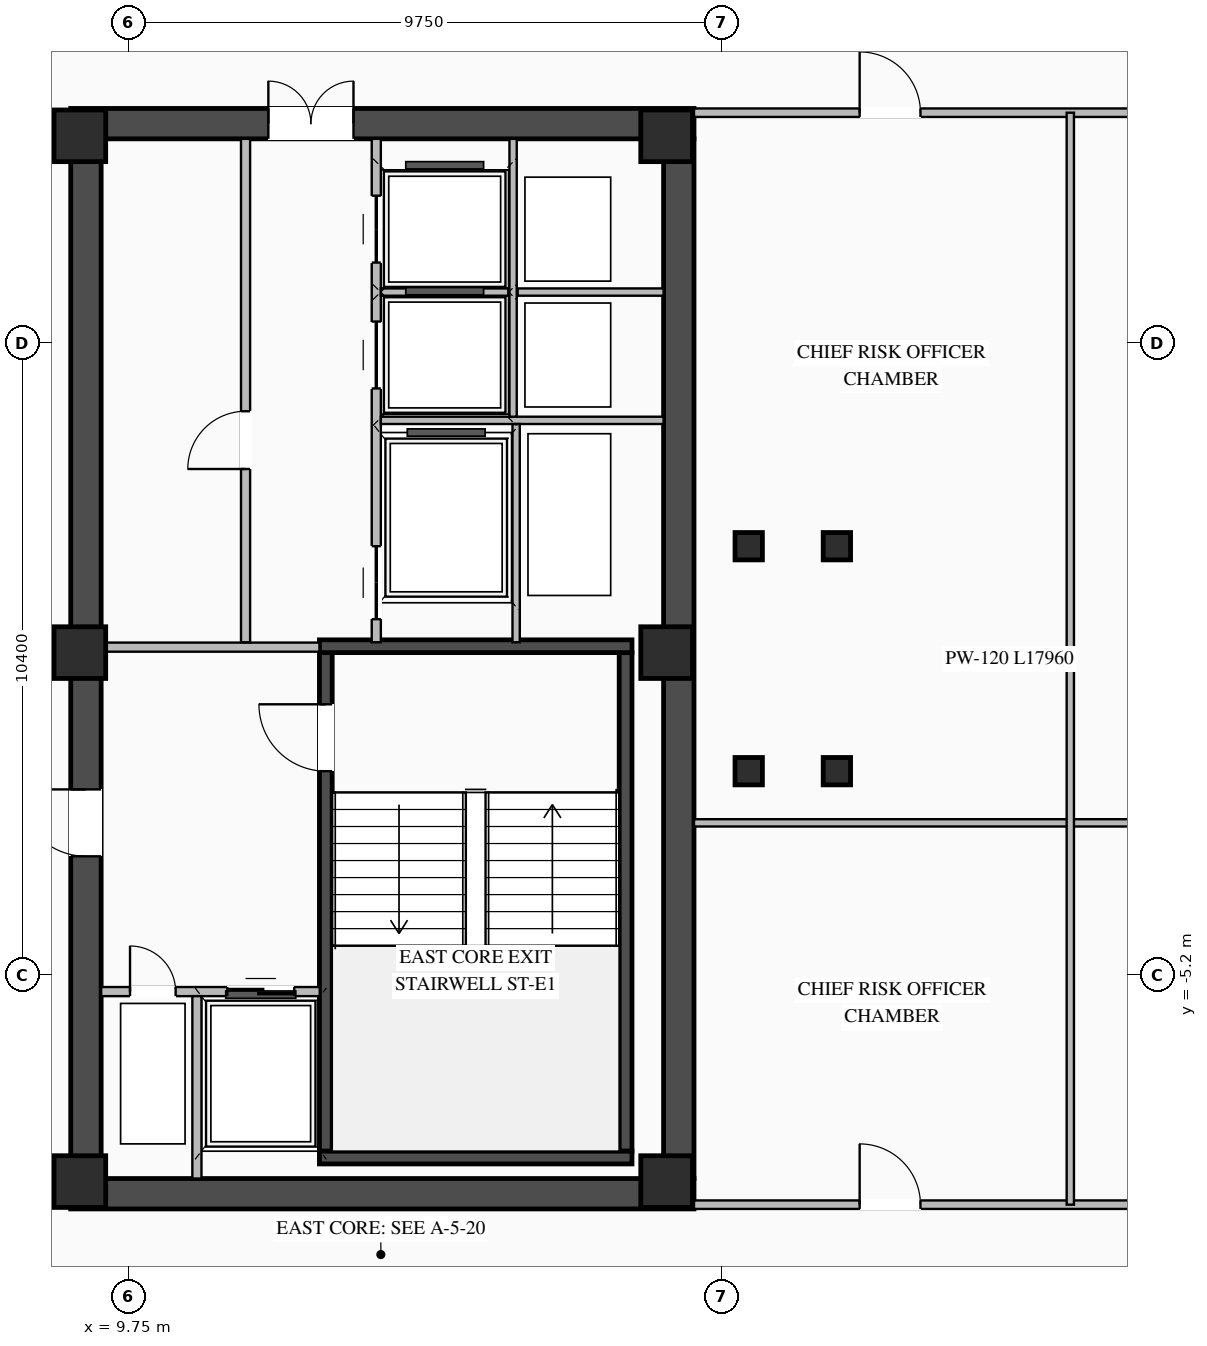
"""IFC4 building model, lengths in metres.
Left out: names, types, materials, properties, quantities, classifications, styles, units other than length and angle.
Written with IfcOpenShell. Run it as: python <this file> out.ifc"""

import sys

from ifc_helpers import new_model, si_unit, direction, frame, frame_2d, origin, origin_2d, place, context, subcontext, project, spatial, rectangle, i_section, extrude, element, fill, save


model = new_model("IFC4")
c1 = context("Model", 3, precision=1e-05, world=origin(), true_north=direction((0.0, 1.0)))
c2 = subcontext(c1, "Body", "Model", "MODEL_VIEW")
j1 = project(units=[si_unit("LENGTHUNIT", "METRE"), si_unit("PLANEANGLEUNIT", "RADIAN")], contexts=[c1])
p1 = place(None, origin())
s1 = spatial("IfcSite", under=j1, at=p1, CompositionType="ELEMENT")
p2 = place(p1, origin())
s2 = spatial("IfcBuilding", under=s1, at=p2, CompositionType="ELEMENT")
p3 = place(p2, frame((0.0, 0.0, 251.7)))
s3 = spatial("IfcBuildingStorey", under=s2, at=p3, CompositionType="ELEMENT", Elevation=251.7)
p4 = place(p3, frame((8.8, -8.8, 0.0), z_axis=(0.0, 0.0, 1.0), x_axis=(1.0, 0.0, 0.0)))
e1 = element("IfcWall", 1, at=p4, inside=s3, PredefinedType="SHEAR", context=c2, shape_type="SweptSolid", body=[
    extrude(rectangle(XDim=10.25, YDim=0.5, at=frame_2d((5.125, 0.0))), origin(), (0.0, 0.0, 1.0), 3.27),
])
p5 = place(p3, frame((8.8, 8.8, 0.0), z_axis=(0.0, 0.0, 1.0), x_axis=(1.0, 0.0, 0.0)))
e2 = element("IfcWall", 2, at=p5, inside=s3, PredefinedType="SHEAR", context=c2, shape_type="SweptSolid", body=[
    extrude(rectangle(XDim=10.25, YDim=0.5, at=frame_2d((5.125, 0.0))), origin(), (0.0, 0.0, 1.0), 3.27),
])
p6 = place(p5, frame((3.25, 0.0, 0.0)))
e3 = element("IfcOpeningElement", 3, at=p6, cuts=e2, PredefinedType="OPENING", context=c2, shape_type="SweptSolid", body=[
    extrude(rectangle(XDim=1.4, YDim=2.05, at=frame_2d((0.7, 1.025))), frame((0.0, 0.26, 0.0), z_axis=(0.0, -1.0, 0.0), x_axis=(1.0, 0.0, 0.0)), (0.0, 0.0, 1.0), 0.52),
])
p7 = place(p3, frame((9.05, -8.55, 0.0), z_axis=(0.0, 0.0, 1.0), x_axis=(0.0, 1.0, 0.0)))
e4 = element("IfcWall", 4, at=p7, inside=s3, PredefinedType="SHEAR", context=c2, shape_type="SweptSolid", body=[
    extrude(rectangle(XDim=17.1, YDim=0.5, at=frame_2d((8.55, 0.0))), origin(), (0.0, 0.0, 1.0), 3.27),
])
p8 = place(p7, frame((5.3, 0.0, 0.0)))
e5 = element("IfcOpeningElement", 5, at=p8, cuts=e4, PredefinedType="OPENING", context=c2, shape_type="SweptSolid", body=[
    extrude(rectangle(XDim=1.1, YDim=2.08, at=frame_2d((0.55, 1.04))), frame((0.0, 0.26, 0.0), z_axis=(0.0, -1.0, 0.0), x_axis=(1.0, 0.0, 0.0)), (0.0, 0.0, 1.0), 0.52),
])
p9 = place(p3, frame((18.8, -8.55, 0.0), z_axis=(0.0, 0.0, 1.0), x_axis=(0.0, 1.0, 0.0)))
e6 = element("IfcWall", 6, at=p9, inside=s3, PredefinedType="SHEAR", context=c2, shape_type="SweptSolid", body=[
    extrude(rectangle(XDim=17.1, YDim=0.5, at=frame_2d((8.55, 0.0))), origin(), (0.0, 0.0, 1.0), 3.27),
])
p10 = place(p3, frame((12.995, -8.1, 0.0), z_axis=(0.0, 0.0, 1.0), x_axis=(0.0, 1.0, 0.0)))
e7 = element("IfcWall", 7, at=p10, inside=s3, PredefinedType="SHEAR", context=c2, shape_type="SweptSolid", body=[
    extrude(rectangle(XDim=8.2, YDim=0.21, at=frame_2d((4.1, 0.0))), origin(), (0.0, 0.0, 1.0), 3.27),
])
p11 = place(p10, frame((6.25, 0.0, 0.0)))
e8 = element("IfcOpeningElement", 8, at=p11, cuts=e7, PredefinedType="OPENING", context=c2, shape_type="SweptSolid", body=[
    extrude(rectangle(XDim=1.1, YDim=2.15, at=frame_2d((0.55, 1.075))), frame((0.0, 0.115, 0.0), z_axis=(0.0, -1.0, 0.0), x_axis=(1.0, 0.0, 0.0)), (0.0, 0.0, 1.0), 0.23),
])
p12 = place(p3, frame((17.925, -8.1, 0.0), z_axis=(0.0, 0.0, 1.0), x_axis=(0.0, 1.0, 0.0)))
e9 = element("IfcWall", 9, at=p12, inside=s3, PredefinedType="SHEAR", context=c2, shape_type="SweptSolid", body=[
    extrude(rectangle(XDim=8.2, YDim=0.21, at=frame_2d((4.1, 0.0))), origin(), (0.0, 0.0, 1.0), 3.27),
])
for number, where, z_axis, x_axis in (
    (10, (12.89, -8.205, 0.0), (0.0, 0.0, 1.0), (1.0, 0.0, 0.0)),
    (11, (18.03, 0.205, 0.0), (0.0, 0.0, 1.0), (-1.0, 0.0, 0.0)),
):
    element("IfcWall", number, at=place(p3, frame(where, z_axis=z_axis, x_axis=x_axis)), inside=s3, PredefinedType="SHEAR", context=c2, shape_type="SweptSolid", body=[
        extrude(rectangle(XDim=5.14, YDim=0.21, at=frame_2d((2.57, 0.0))), origin(), (0.0, 0.0, 1.0), 3.27),
    ])
for number, where, z_axis, x_axis in (
    (12, (8.95, -8.6, 0.0), (0.0, 0.0, 1.0), (1.0, 0.0, 0.0)),
    (13, (8.95, 0.1, 0.0), (0.0, 0.0, 1.0), (1.0, 0.0, 0.0)),
    (14, (8.95, 8.6, 0.0), (0.0, 0.0, 1.0), (1.0, 0.0, 0.0)),
    (15, (18.6, -8.6, 0.0), (0.0, 0.0, 1.0), (1.0, 0.0, 0.0)),
    (16, (18.6, 0.1, 0.0), (0.0, 0.0, 1.0), (1.0, 0.0, 0.0)),
    (17, (18.6, 8.6, 0.0), (0.0, 0.0, 1.0), (1.0, 0.0, 0.0)),
):
    element("IfcColumn", number, at=place(p3, frame(where, z_axis=z_axis, x_axis=x_axis)), inside=s3, PredefinedType="COLUMN", context=c2, shape_type="SweptSolid", body=[
        extrude(rectangle(XDim=0.85, YDim=0.85, at=origin_2d()), origin(), (0.0, 0.0, 1.0), 3.45),
    ])
for number, where, z_axis, x_axis in (
    (18, (19.95, -1.85, 0.0), (0.0, 0.0, 1.0), (1.0, 0.0, 0.0)),
    (19, (19.95, 1.85, 0.0), (0.0, 0.0, 1.0), (1.0, 0.0, 0.0)),
    (20, (21.4, -1.85, 0.0), (0.0, 0.0, 1.0), (1.0, 0.0, 0.0)),
    (21, (21.4, 1.85, 0.0), (0.0, 0.0, 1.0), (1.0, 0.0, 0.0)),
):
    element("IfcColumn", number, at=place(p3, frame(where, z_axis=z_axis, x_axis=x_axis)), inside=s3, PredefinedType="COLUMN", context=c2, shape_type="SweptSolid", body=[
        extrude(i_section(OverallWidth=0.45, OverallDepth=0.45, WebThickness=0.022, FlangeThickness=0.032, at=origin_2d()), origin(), (0.0, 0.0, 1.0), 3.45),
    ])
p13 = place(p3, frame((9.3, -5.475, 0.0), z_axis=(0.0, 0.0, 1.0), x_axis=(1.0, 0.0, 0.0)))
e22 = element("IfcWall", 22, at=p13, inside=s3, PredefinedType="STANDARD", context=c2, shape_type="SweptSolid", body=[
    extrude(rectangle(XDim=3.595, YDim=0.15, at=frame_2d((1.797, 0.0))), origin(), (0.0, 0.0, 1.0), 3.25),
])
p14 = place(p13, frame((2.075, 0.0, 0.0)))
e23 = element("IfcOpeningElement", 23, at=p14, cuts=e22, PredefinedType="OPENING", context=c2, shape_type="SweptSolid", body=[
    extrude(rectangle(XDim=1.1, YDim=2.15, at=frame_2d((0.55, 1.075))), frame((0.0, 0.085, 0.0), z_axis=(0.0, -1.0, 0.0), x_axis=(1.0, 0.0, 0.0)), (0.0, 0.0, 1.0), 0.17),
])
p15 = place(p13, frame((0.475, 0.0, 0.0)))
e24 = element("IfcOpeningElement", 24, at=p15, cuts=e22, PredefinedType="OPENING", context=c2, shape_type="SweptSolid", body=[
    extrude(rectangle(XDim=0.75, YDim=2.05, at=frame_2d((0.375, 1.025))), frame((0.0, 0.085, 0.0), z_axis=(0.0, -1.0, 0.0), x_axis=(1.0, 0.0, 0.0)), (0.0, 0.0, 1.0), 0.17),
])
p16 = place(p3, frame((10.875, -8.55, 0.0), z_axis=(0.0, 0.0, 1.0), x_axis=(0.0, 1.0, 0.0)))
e25 = element("IfcWall", 25, at=p16, inside=s3, PredefinedType="STANDARD", context=c2, shape_type="SweptSolid", body=[
    extrude(rectangle(XDim=3.0, YDim=0.15, at=frame_2d((1.5, 0.0))), origin(), (0.0, 0.0, 1.0), 3.25),
])
p17 = place(p3, frame((9.3, 0.19, 0.0), z_axis=(0.0, 0.0, 1.0), x_axis=(1.0, 0.0, 0.0)))
e26 = element("IfcWall", 26, at=p17, inside=s3, PredefinedType="STANDARD", context=c2, shape_type="SweptSolid", body=[
    extrude(rectangle(XDim=3.59, YDim=0.15, at=frame_2d((1.795, 0.0))), origin(), (0.0, 0.0, 1.0), 2.645),
])
p18 = place(p3, frame((11.675, 0.27, 0.0), z_axis=(0.0, 0.0, 1.0), x_axis=(0.0, 1.0, 0.0)))
e27 = element("IfcWall", 27, at=p18, inside=s3, PredefinedType="STANDARD", context=c2, shape_type="SweptSolid", body=[
    extrude(rectangle(XDim=8.28, YDim=0.15, at=frame_2d((4.14, 0.0))), origin(), (0.0, 0.0, 1.0), 3.25),
])
p19 = place(p18, frame((2.85, 0.0, 0.0)))
e28 = element("IfcOpeningElement", 28, at=p19, cuts=e27, PredefinedType="OPENING", context=c2, shape_type="SweptSolid", body=[
    extrude(rectangle(XDim=0.95, YDim=2.05, at=frame_2d((0.475, 1.025))), frame((0.0, 0.085, 0.0), z_axis=(0.0, -1.0, 0.0), x_axis=(1.0, 0.0, 0.0)), (0.0, 0.0, 1.0), 0.17),
])
p20 = place(p3, frame((13.825, 0.27, 0.0), z_axis=(0.0, 0.0, 1.0), x_axis=(0.0, 1.0, 0.0)))
e29 = element("IfcWall", 29, at=p20, inside=s3, PredefinedType="STANDARD", context=c2, shape_type="SweptSolid", body=[
    extrude(rectangle(XDim=8.28, YDim=0.15, at=frame_2d((4.14, 0.0))), origin(), (0.0, 0.0, 1.0), 3.25),
])
p21 = place(p20, frame((4.175, 0.0, 0.0)))
e30 = element("IfcOpeningElement", 30, at=p21, cuts=e29, PredefinedType="OPENING", context=c2, shape_type="SweptSolid", body=[
    extrude(rectangle(XDim=1.1, YDim=2.1, at=frame_2d((0.55, 1.05))), frame((0.0, 0.085, 0.0), z_axis=(0.0, -1.0, 0.0), x_axis=(1.0, 0.0, 0.0)), (0.0, 0.0, 1.0), 0.17),
])
p22 = place(p20, frame((6.245, 0.0, 0.0)))
e31 = element("IfcOpeningElement", 31, at=p22, cuts=e29, PredefinedType="OPENING", context=c2, shape_type="SweptSolid", body=[
    extrude(rectangle(XDim=1.1, YDim=2.1, at=frame_2d((0.55, 1.05))), frame((0.0, 0.085, 0.0), z_axis=(0.0, -1.0, 0.0), x_axis=(1.0, 0.0, 0.0)), (0.0, 0.0, 1.0), 0.17),
])
p23 = place(p20, frame((0.38, 0.0, 0.0)))
e32 = element("IfcOpeningElement", 32, at=p23, cuts=e29, PredefinedType="OPENING", context=c2, shape_type="SweptSolid", body=[
    extrude(rectangle(XDim=1.2, YDim=2.1, at=frame_2d((0.6, 1.05))), frame((0.0, 0.085, 0.0), z_axis=(0.0, -1.0, 0.0), x_axis=(1.0, 0.0, 0.0)), (0.0, 0.0, 1.0), 0.17),
])
p24 = place(p3, frame((13.9, 3.92, 0.0), z_axis=(0.0, 0.0, 1.0), x_axis=(1.0, 0.0, 0.0)))
e33 = element("IfcWall", 33, at=p24, inside=s3, PredefinedType="STANDARD", context=c2, shape_type="SweptSolid", body=[
    extrude(rectangle(XDim=4.65, YDim=0.12, at=frame_2d((2.325, 0.0))), origin(), (0.0, 0.0, 1.0), 3.25),
])
p25 = place(p3, frame((16.15, 6.03, 0.0), z_axis=(0.0, 0.0, 1.0), x_axis=(1.0, 0.0, 0.0)))
e34 = element("IfcWall", 34, at=p25, inside=s3, PredefinedType="STANDARD", context=c2, shape_type="SweptSolid", body=[
    extrude(rectangle(XDim=2.4, YDim=0.12, at=frame_2d((1.2, 0.0))), origin(), (0.0, 0.0, 1.0), 3.25),
])
p26 = place(p3, frame((16.075, 3.98, 0.0), z_axis=(0.0, 0.0, 1.0), x_axis=(0.0, 1.0, 0.0)))
e35 = element("IfcWall", 35, at=p26, inside=s3, PredefinedType="STANDARD", context=c2, shape_type="SweptSolid", body=[
    extrude(rectangle(XDim=4.57, YDim=0.12, at=frame_2d((2.285, 0.0))), origin(), (0.0, 0.0, 1.0), 3.25),
])
p27 = place(p3, frame((13.9, 6.03, 0.0), z_axis=(0.0, 0.0, 1.0), x_axis=(1.0, 0.0, 0.0)))
e36 = element("IfcWall", 36, at=p27, inside=s3, PredefinedType="STANDARD", context=c2, shape_type="SweptSolid", body=[
    extrude(rectangle(XDim=2.1, YDim=0.12, at=frame_2d((1.05, 0.0))), origin(), (0.0, 0.0, 1.0), 3.25),
])
p28 = place(p3, frame((16.125, 0.27, 0.0), z_axis=(0.0, 0.0, 1.0), x_axis=(0.0, 1.0, 0.0)))
e37 = element("IfcWall", 37, at=p28, inside=s3, PredefinedType="STANDARD", context=c2, shape_type="SweptSolid", body=[
    extrude(rectangle(XDim=3.59, YDim=0.12, at=frame_2d((1.795, 0.0))), origin(), (0.0, 0.0, 1.0), 3.25),
])
p29 = place(p3, frame((19.05, 8.98, 0.0), z_axis=(0.0, 0.0, 1.0), x_axis=(1.0, 0.0, 0.0)))
e38 = element("IfcWall", 38, at=p29, inside=s3, PredefinedType="STANDARD", context=c2, shape_type="SweptSolid", body=[
    extrude(rectangle(XDim=10.709, YDim=0.14, at=frame_2d((5.354, 0.0))), origin(), (0.0, 0.0, 1.0), 3.25),
])
p30 = place(p29, frame((2.725, 0.0, 0.0)))
e39 = element("IfcOpeningElement", 39, at=p30, cuts=e38, PredefinedType="OPENING", context=c2, shape_type="SweptSolid", body=[
    extrude(rectangle(XDim=1.0, YDim=2.08, at=frame_2d((0.5, 1.04))), frame((0.0, 0.08, 0.0), z_axis=(0.0, -1.0, 0.0), x_axis=(1.0, 0.0, 0.0)), (0.0, 0.0, 1.0), 0.16),
])
p31 = place(p29, frame((7.819, 0.0, 0.0)))
e40 = element("IfcOpeningElement", 40, at=p31, cuts=e38, PredefinedType="OPENING", context=c2, shape_type="SweptSolid", body=[
    extrude(rectangle(XDim=1.0, YDim=2.08, at=frame_2d((0.5, 1.04))), frame((0.0, 0.08, 0.0), z_axis=(0.0, -1.0, 0.0), x_axis=(1.0, 0.0, 0.0)), (0.0, 0.0, 1.0), 0.16),
])
p32 = place(p3, frame((19.05, -8.98, 0.0), z_axis=(0.0, 0.0, 1.0), x_axis=(1.0, 0.0, 0.0)))
e41 = element("IfcWall", 41, at=p32, inside=s3, PredefinedType="STANDARD", context=c2, shape_type="SweptSolid", body=[
    extrude(rectangle(XDim=12.438, YDim=0.14, at=frame_2d((6.219, 0.0))), origin(), (0.0, 0.0, 1.0), 3.25),
])
p33 = place(p32, frame((2.725, 0.0, 0.0)))
e42 = element("IfcOpeningElement", 42, at=p33, cuts=e41, PredefinedType="OPENING", context=c2, shape_type="SweptSolid", body=[
    extrude(rectangle(XDim=1.0, YDim=2.08, at=frame_2d((0.5, 1.04))), frame((0.0, 0.08, 0.0), z_axis=(0.0, -1.0, 0.0), x_axis=(1.0, 0.0, 0.0)), (0.0, 0.0, 1.0), 0.16),
])
p34 = place(p32, frame((8.684, 0.0, 0.0)))
e43 = element("IfcOpeningElement", 43, at=p34, cuts=e41, PredefinedType="OPENING", context=c2, shape_type="SweptSolid", body=[
    extrude(rectangle(XDim=1.0, YDim=2.08, at=frame_2d((0.5, 1.04))), frame((0.0, 0.08, 0.0), z_axis=(0.0, -1.0, 0.0), x_axis=(1.0, 0.0, 0.0)), (0.0, 0.0, 1.0), 0.16),
])
p35 = place(p3, frame((19.05, -2.7, 0.0), z_axis=(0.0, 0.0, 1.0), x_axis=(1.0, 0.0, 0.0)))
e44 = element("IfcWall", 44, at=p35, inside=s3, PredefinedType="STANDARD", context=c2, shape_type="SweptSolid", body=[
    extrude(rectangle(XDim=11.833, YDim=0.12, at=frame_2d((5.917, 0.0))), origin(), (0.0, 0.0, 1.0), 3.25),
])
p36 = place(p3, frame((25.239, -8.98, 0.0), z_axis=(0.0, 0.0, 1.0), x_axis=(0.0, 1.0, 0.0)))
e45 = element("IfcWall", 45, at=p36, inside=s3, PredefinedType="STANDARD", context=c2, shape_type="SweptSolid", body=[
    extrude(rectangle(XDim=17.96, YDim=0.12, at=frame_2d((8.98, 0.0))), origin(), (0.0, 0.0, 1.0), 3.25),
])
p37 = place(p11, origin())
e46 = element("IfcDoor", 46, at=p37, inside=s3, OperationType="SINGLE_SWING_RIGHT", PredefinedType="DOOR", context=c2, shape_type="SweptSolid", body=[
    extrude(rectangle(XDim=1.1, YDim=2.15, at=frame_2d((0.55, 1.075))), frame((0.0, 0.025, 0.0), z_axis=(0.0, -1.0, 0.0), x_axis=(1.0, 0.0, 0.0)), (0.0, 0.0, 1.0), 0.05),
])
fill(e8, e46)
p38 = place(p14, origin())
e47 = element("IfcDoor", 47, at=p38, inside=s3, OperationType="DOUBLE_DOOR_SLIDING", PredefinedType="DOOR", context=c2, shape_type="SweptSolid", body=[
    extrude(rectangle(XDim=1.1, YDim=2.15, at=frame_2d((0.55, 1.075))), frame((0.0, 0.025, 0.0), z_axis=(0.0, -1.0, 0.0), x_axis=(1.0, 0.0, 0.0)), (0.0, 0.0, 1.0), 0.05),
])
fill(e23, e47)
p39 = place(p15, origin())
e48 = element("IfcDoor", 48, at=p39, inside=s3, OperationType="SINGLE_SWING_LEFT", PredefinedType="DOOR", context=c2, shape_type="SweptSolid", body=[
    extrude(rectangle(XDim=0.75, YDim=2.05, at=frame_2d((0.375, 1.025))), frame((0.0, 0.025, 0.0), z_axis=(0.0, -1.0, 0.0), x_axis=(1.0, 0.0, 0.0)), (0.0, 0.0, 1.0), 0.05),
])
fill(e24, e48)
p40 = place(p8, origin())
e49 = element("IfcDoor", 49, at=p40, inside=s3, OperationType="SINGLE_SWING_RIGHT", PredefinedType="DOOR", context=c2, shape_type="SweptSolid", body=[
    extrude(rectangle(XDim=1.1, YDim=2.08, at=frame_2d((0.55, 1.04))), frame((0.0, -0.155, 0.0), z_axis=(0.0, -1.0, 0.0), x_axis=(1.0, 0.0, 0.0)), (0.0, 0.0, 1.0), 0.05),
])
fill(e5, e49)
p41 = place(p6, origin())
e50 = element("IfcDoor", 50, at=p41, inside=s3, OperationType="DOUBLE_DOOR_SINGLE_SWING", PredefinedType="DOOR", context=c2, shape_type="SweptSolid", body=[
    extrude(rectangle(XDim=1.4, YDim=2.05, at=frame_2d((0.7, 1.025))), frame((0.0, 0.195, 0.0), z_axis=(0.0, -1.0, 0.0), x_axis=(1.0, 0.0, 0.0)), (0.0, 0.0, 1.0), 0.05),
])
fill(e3, e50)
p42 = place(p19, origin())
e51 = element("IfcDoor", 51, at=p42, inside=s3, OperationType="SINGLE_SWING_LEFT", PredefinedType="DOOR", context=c2, shape_type="SweptSolid", body=[
    extrude(rectangle(XDim=0.95, YDim=2.05, at=frame_2d((0.475, 1.025))), frame((0.0, 0.025, 0.0), z_axis=(0.0, -1.0, 0.0), x_axis=(1.0, 0.0, 0.0)), (0.0, 0.0, 1.0), 0.05),
])
fill(e28, e51)
p43 = place(p21, origin())
e52 = element("IfcDoor", 52, at=p43, inside=s3, OperationType="DOUBLE_DOOR_SLIDING", PredefinedType="DOOR", context=c2, shape_type="SweptSolid", body=[
    extrude(rectangle(XDim=1.1, YDim=2.1, at=frame_2d((0.55, 1.05))), frame((0.0, 0.025, 0.0), z_axis=(0.0, -1.0, 0.0), x_axis=(1.0, 0.0, 0.0)), (0.0, 0.0, 1.0), 0.05),
])
fill(e30, e52)
p44 = place(p22, origin())
e53 = element("IfcDoor", 53, at=p44, inside=s3, OperationType="DOUBLE_DOOR_SLIDING", PredefinedType="DOOR", context=c2, shape_type="SweptSolid", body=[
    extrude(rectangle(XDim=1.1, YDim=2.1, at=frame_2d((0.55, 1.05))), frame((0.0, 0.025, 0.0), z_axis=(0.0, -1.0, 0.0), x_axis=(1.0, 0.0, 0.0)), (0.0, 0.0, 1.0), 0.05),
])
fill(e31, e53)
p45 = place(p23, origin())
e54 = element("IfcDoor", 54, at=p45, inside=s3, OperationType="DOUBLE_DOOR_SLIDING", PredefinedType="DOOR", context=c2, shape_type="SweptSolid", body=[
    extrude(rectangle(XDim=1.2, YDim=2.1, at=frame_2d((0.6, 1.05))), frame((0.0, 0.025, 0.0), z_axis=(0.0, -1.0, 0.0), x_axis=(1.0, 0.0, 0.0)), (0.0, 0.0, 1.0), 0.05),
])
fill(e32, e54)
p46 = place(p30, origin())
e55 = element("IfcDoor", 55, at=p46, inside=s3, OperationType="SINGLE_SWING_LEFT", PredefinedType="DOOR", context=c2, shape_type="SweptSolid", body=[
    extrude(rectangle(XDim=1.0, YDim=2.08, at=frame_2d((0.5, 1.04))), frame((0.0, 0.025, 0.0), z_axis=(0.0, -1.0, 0.0), x_axis=(1.0, 0.0, 0.0)), (0.0, 0.0, 1.0), 0.05),
])
fill(e39, e55)
p47 = place(p33, origin())
e56 = element("IfcDoor", 56, at=p47, inside=s3, OperationType="SINGLE_SWING_LEFT", PredefinedType="DOOR", context=c2, shape_type="SweptSolid", body=[
    extrude(rectangle(XDim=1.0, YDim=2.08, at=frame_2d((0.5, 1.04))), frame((0.0, 0.025, 0.0), z_axis=(0.0, -1.0, 0.0), x_axis=(1.0, 0.0, 0.0)), (0.0, 0.0, 1.0), 0.05),
])
fill(e42, e56)
save(model, sys.argv[1])
